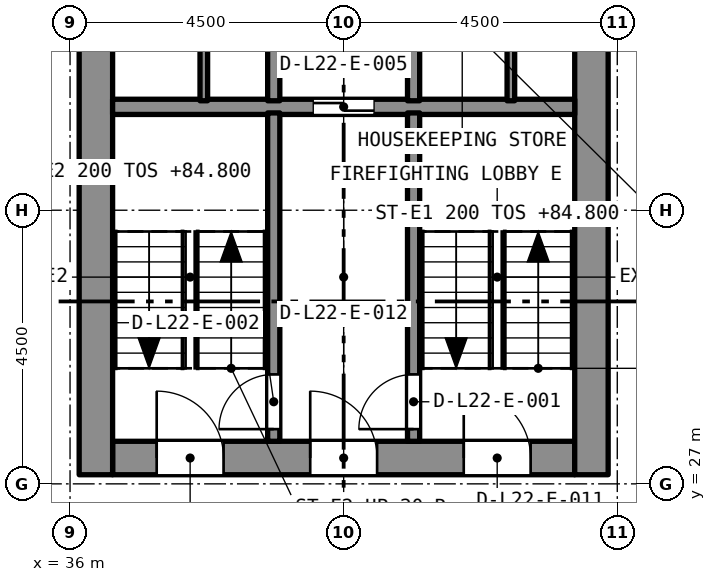
"""IFC4 building model, lengths in metres.
Left out: names, types, materials, properties, quantities, classifications, styles, units other than length and angle.
Written with IfcOpenShell. Run it as: python <this file> out.ifc"""

import sys

from ifc_helpers import new_model, si_unit, direction, frame, frame_2d, origin, place, context, subcontext, project, spatial, rectangle, extrude, element, fill, save


model = new_model("IFC4")
c1 = context("Model", 3, precision=1e-05, world=origin(), true_north=direction((0.0, 1.0)))
c2 = subcontext(c1, "Body", "Model", "MODEL_VIEW")
j1 = project(units=[si_unit("LENGTHUNIT", "METRE"), si_unit("PLANEANGLEUNIT", "RADIAN")], contexts=[c1])
p1 = place(None, origin())
s1 = spatial("IfcSite", under=j1, at=p1, CompositionType="ELEMENT")
p2 = place(p1, origin())
s2 = spatial("IfcBuilding", under=s1, at=p2, CompositionType="ELEMENT")
p3 = place(p2, frame((0.0, 0.0, 83.2)))
s3 = spatial("IfcBuildingStorey", under=s2, at=p3, CompositionType="ELEMENT", Elevation=83.2)
p4 = place(p3, frame((36.7, 27.425, 0.0), z_axis=(0.0, 0.0, 1.0), x_axis=(1.0, 0.0, 0.0)))
e1 = element("IfcWall", 1, at=p4, inside=s3, PredefinedType="SOLIDWALL", context=c2, shape_type="SweptSolid", body=[
    extrude(rectangle(XDim=7.6, YDim=0.55, at=frame_2d((3.8, 0.0))), origin(), (0.0, 0.0, 1.0), 3.2),
])
p5 = place(p4, frame((5.775, 0.0, 0.0)))
e2 = element("IfcOpeningElement", 2, at=p5, cuts=e1, PredefinedType="OPENING", context=c2, shape_type="SweptSolid", body=[
    extrude(rectangle(XDim=1.1, YDim=2.1, at=frame_2d((0.55, 1.05))), frame((0.0, 0.285, 0.0), z_axis=(0.0, -1.0, 0.0), x_axis=(1.0, 0.0, 0.0)), (0.0, 0.0, 1.0), 0.57),
])
p6 = place(p4, frame((3.25, 0.0, 0.0)))
e3 = element("IfcOpeningElement", 3, at=p6, cuts=e1, PredefinedType="OPENING", context=c2, shape_type="SweptSolid", body=[
    extrude(rectangle(XDim=1.1, YDim=2.1, at=frame_2d((0.55, 1.05))), frame((0.0, 0.285, 0.0), z_axis=(0.0, -1.0, 0.0), x_axis=(1.0, 0.0, 0.0)), (0.0, 0.0, 1.0), 0.57),
])
p7 = place(p4, frame((0.725, 0.0, 0.0)))
e4 = element("IfcOpeningElement", 4, at=p7, cuts=e1, PredefinedType="OPENING", context=c2, shape_type="SweptSolid", body=[
    extrude(rectangle(XDim=1.1, YDim=2.1, at=frame_2d((0.55, 1.05))), frame((0.0, 0.285, 0.0), z_axis=(0.0, -1.0, 0.0), x_axis=(1.0, 0.0, 0.0)), (0.0, 0.0, 1.0), 0.57),
])
p8 = place(p3, frame((36.425, 27.15, 0.0), z_axis=(0.0, 0.0, 1.0), x_axis=(0.0, 1.0, 0.0)))
e5 = element("IfcWall", 5, at=p8, inside=s3, PredefinedType="SOLIDWALL", context=c2, shape_type="SweptSolid", body=[
    extrude(rectangle(XDim=13.2, YDim=0.55, at=frame_2d((6.6, 0.0))), origin(), (0.0, 0.0, 1.0), 3.2),
])
p9 = place(p8, frame((8.8, 0.0, 0.0)))
e6 = element("IfcOpeningElement", 6, at=p9, cuts=e5, PredefinedType="OPENING", context=c2, shape_type="SweptSolid", body=[
    extrude(rectangle(XDim=1.2, YDim=2.1, at=frame_2d((0.6, 1.05))), frame((0.0, 0.285, 0.0), z_axis=(0.0, -1.0, 0.0), x_axis=(1.0, 0.0, 0.0)), (0.0, 0.0, 1.0), 0.57),
])
p10 = place(p3, frame((44.575, 27.15, 0.0), z_axis=(0.0, 0.0, 1.0), x_axis=(0.0, 1.0, 0.0)))
e7 = element("IfcWall", 7, at=p10, inside=s3, PredefinedType="SOLIDWALL", context=c2, shape_type="SweptSolid", body=[
    extrude(rectangle(XDim=13.2, YDim=0.55, at=frame_2d((6.6, 0.0))), origin(), (0.0, 0.0, 1.0), 3.2),
])
p11 = place(p10, frame((8.8, 0.0, 0.0)))
e8 = element("IfcOpeningElement", 8, at=p11, cuts=e7, PredefinedType="OPENING", context=c2, shape_type="SweptSolid", body=[
    extrude(rectangle(XDim=1.2, YDim=2.1, at=frame_2d((0.6, 1.05))), frame((0.0, 0.285, 0.0), z_axis=(0.0, -1.0, 0.0), x_axis=(1.0, 0.0, 0.0)), (0.0, 0.0, 1.0), 0.57),
])
p12 = place(p3, frame((36.7, 33.2, 0.0), z_axis=(0.0, 0.0, 1.0), x_axis=(1.0, 0.0, 0.0)))
e9 = element("IfcWall", 9, at=p12, inside=s3, PredefinedType="SOLIDWALL", context=c2, shape_type="SweptSolid", body=[
    extrude(rectangle(XDim=7.6, YDim=0.25, at=frame_2d((3.8, 0.0))), origin(), (0.0, 0.0, 1.0), 2.9),
])
p13 = place(p12, frame((3.3, 0.0, 0.0)))
e10 = element("IfcOpeningElement", 10, at=p13, cuts=e9, PredefinedType="OPENING", context=c2, shape_type="SweptSolid", body=[
    extrude(rectangle(XDim=1.0, YDim=2.1, at=frame_2d((0.5, 1.05))), frame((0.0, 0.135, 0.0), z_axis=(0.0, -1.0, 0.0), x_axis=(1.0, 0.0, 0.0)), (0.0, 0.0, 1.0), 0.27),
])
p14 = place(p3, frame((41.65, 27.7, 0.0), z_axis=(0.0, 0.0, 1.0), x_axis=(0.0, 1.0, 0.0)))
e11 = element("IfcWall", 11, at=p14, inside=s3, PredefinedType="SOLIDWALL", context=c2, shape_type="SweptSolid", body=[
    extrude(rectangle(XDim=5.4, YDim=0.2, at=frame_2d((2.7, 0.0))), origin(), (0.0, 0.0, 1.0), 2.9),
])
p15 = place(p14, frame((0.2, 0.0, 0.0)))
e12 = element("IfcOpeningElement", 12, at=p15, cuts=e11, PredefinedType="OPENING", context=c2, shape_type="SweptSolid", body=[
    extrude(rectangle(XDim=0.9, YDim=2.1, at=frame_2d((0.45, 1.05))), frame((0.0, 0.11, 0.0), z_axis=(0.0, -1.0, 0.0), x_axis=(1.0, 0.0, 0.0)), (0.0, 0.0, 1.0), 0.22),
])
p16 = place(p3, frame((39.35, 27.7, 0.0), z_axis=(0.0, 0.0, 1.0), x_axis=(0.0, 1.0, 0.0)))
e13 = element("IfcWall", 13, at=p16, inside=s3, PredefinedType="SOLIDWALL", context=c2, shape_type="SweptSolid", body=[
    extrude(rectangle(XDim=5.4, YDim=0.2, at=frame_2d((2.7, 0.0))), origin(), (0.0, 0.0, 1.0), 2.9),
])
p17 = place(p16, frame((0.2, 0.0, 0.0)))
e14 = element("IfcOpeningElement", 14, at=p17, cuts=e13, PredefinedType="OPENING", context=c2, shape_type="SweptSolid", body=[
    extrude(rectangle(XDim=0.9, YDim=2.1, at=frame_2d((0.45, 1.05))), frame((0.0, 0.11, 0.0), z_axis=(0.0, -1.0, 0.0), x_axis=(1.0, 0.0, 0.0)), (0.0, 0.0, 1.0), 0.22),
])
for number, where, z_axis, x_axis in (
    (15, (41.65, 33.3, 0.0), (0.0, 0.0, 1.0), (0.0, 1.0, 0.0)),
    (16, (39.35, 33.3, 0.0), (0.0, 0.0, 1.0), (0.0, 1.0, 0.0)),
):
    element("IfcWall", number, at=place(p3, frame(where, z_axis=z_axis, x_axis=x_axis)), inside=s3, PredefinedType="SOLIDWALL", context=c2, shape_type="SweptSolid", body=[
        extrude(rectangle(XDim=2.3, YDim=0.2, at=frame_2d((1.15, 0.0))), origin(), (0.0, 0.0, 1.0), 2.9),
    ])
for number, where, z_axis, x_axis in (
    (17, (43.25, 33.3, 0.0), (0.0, 0.0, 1.0), (0.0, 1.0, 0.0)),
    (18, (38.2, 33.3, 0.0), (0.0, 0.0, 1.0), (0.0, 1.0, 0.0)),
):
    element("IfcWall", number, at=place(p3, frame(where, z_axis=z_axis, x_axis=x_axis)), inside=s3, PredefinedType="PARTITIONING", context=c2, shape_type="SweptSolid", body=[
        extrude(rectangle(XDim=2.3, YDim=0.125, at=frame_2d((1.15, 0.0))), origin(), (0.0, 0.0, 1.0), 2.9),
    ])
p18 = place(p15, origin())
e19 = element("IfcDoor", 19, at=p18, inside=s3, OperationType="SINGLE_SWING_LEFT", PredefinedType="DOOR", context=c2, shape_type="SweptSolid", body=[
    extrude(rectangle(XDim=0.9, YDim=2.1, at=frame_2d((0.45, 1.05))), frame((0.0, 0.025, 0.0), z_axis=(0.0, -1.0, 0.0), x_axis=(1.0, 0.0, 0.0)), (0.0, 0.0, 1.0), 0.05),
])
fill(e12, e19)
p19 = place(p17, origin())
e20 = element("IfcDoor", 20, at=p19, inside=s3, OperationType="SINGLE_SWING_LEFT", PredefinedType="DOOR", context=c2, shape_type="SweptSolid", body=[
    extrude(rectangle(XDim=0.9, YDim=2.1, at=frame_2d((0.45, 1.05))), frame((0.0, 0.025, 0.0), z_axis=(0.0, -1.0, 0.0), x_axis=(1.0, 0.0, 0.0)), (0.0, 0.0, 1.0), 0.05),
])
fill(e14, e20)
p20 = place(p13, origin())
e21 = element("IfcDoor", 21, at=p20, inside=s3, OperationType="SLIDING_TO_LEFT", PredefinedType="DOOR", context=c2, shape_type="SweptSolid", body=[
    extrude(rectangle(XDim=1.0, YDim=2.1, at=frame_2d((0.5, 1.05))), frame((0.0, 0.025, 0.0), z_axis=(0.0, -1.0, 0.0), x_axis=(1.0, 0.0, 0.0)), (0.0, 0.0, 1.0), 0.05),
])
fill(e10, e21)
p21 = place(p5, origin())
e22 = element("IfcDoor", 22, at=p21, inside=s3, OperationType="SINGLE_SWING_LEFT", PredefinedType="DOOR", context=c2, shape_type="SweptSolid", body=[
    extrude(rectangle(XDim=1.1, YDim=2.1, at=frame_2d((0.55, 1.05))), frame((0.0, 0.025, 0.0), z_axis=(0.0, -1.0, 0.0), x_axis=(1.0, 0.0, 0.0)), (0.0, 0.0, 1.0), 0.05),
])
fill(e2, e22)
p22 = place(p6, origin())
e23 = element("IfcDoor", 23, at=p22, inside=s3, OperationType="SINGLE_SWING_LEFT", PredefinedType="DOOR", context=c2, shape_type="SweptSolid", body=[
    extrude(rectangle(XDim=1.1, YDim=2.1, at=frame_2d((0.55, 1.05))), frame((0.0, 0.025, 0.0), z_axis=(0.0, -1.0, 0.0), x_axis=(1.0, 0.0, 0.0)), (0.0, 0.0, 1.0), 0.05),
])
fill(e3, e23)
p23 = place(p7, origin())
e24 = element("IfcDoor", 24, at=p23, inside=s3, OperationType="SINGLE_SWING_LEFT", PredefinedType="DOOR", context=c2, shape_type="SweptSolid", body=[
    extrude(rectangle(XDim=1.1, YDim=2.1, at=frame_2d((0.55, 1.05))), frame((0.0, 0.025, 0.0), z_axis=(0.0, -1.0, 0.0), x_axis=(1.0, 0.0, 0.0)), (0.0, 0.0, 1.0), 0.05),
])
fill(e4, e24)
save(model, sys.argv[1])
